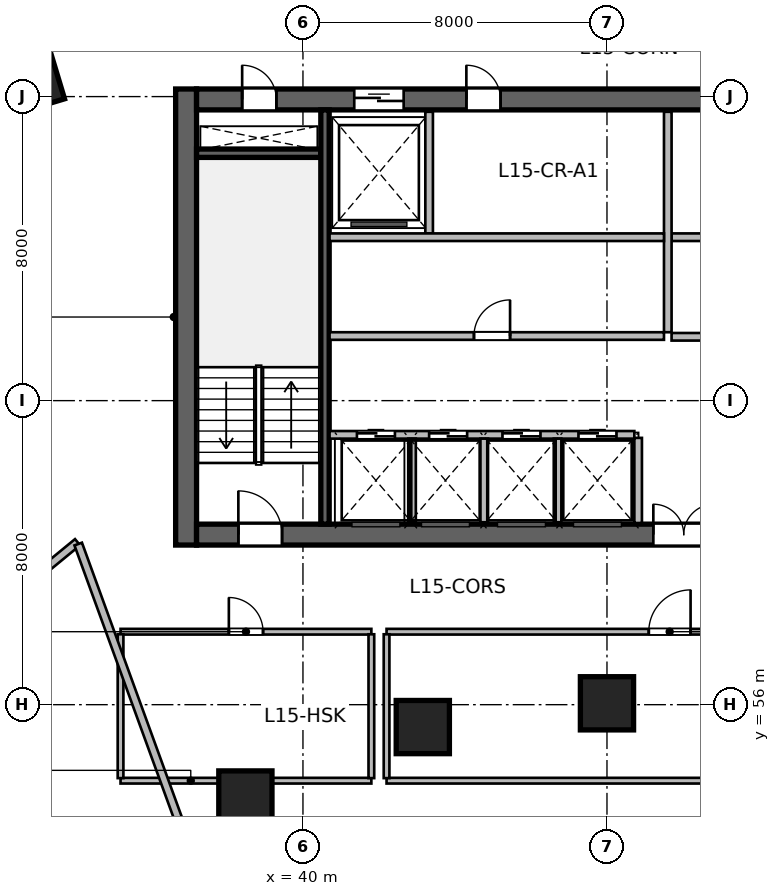
"""IFC4 building model, lengths in metres.
Left out: names, types, materials, properties, quantities, classifications, styles, units other than length and angle.
Written with IfcOpenShell. Run it as: python <this file> out.ifc"""

import sys

from ifc_helpers import new_model, si_unit, direction, frame, frame_2d, origin, origin_2d, place, context, subcontext, project, spatial, rectangle, circle, extrude, source, transform, mapped, element, fill, save


model = new_model("IFC4")
c1 = context("Model", 3, precision=1e-05, world=origin(), true_north=direction((0.0, 1.0)))
c2 = subcontext(c1, "Body", "Model", "MODEL_VIEW")
j1 = project(units=[si_unit("LENGTHUNIT", "METRE"), si_unit("PLANEANGLEUNIT", "RADIAN")], contexts=[c1])
p1 = place(None, origin())
s1 = spatial("IfcSite", under=j1, at=p1, CompositionType="ELEMENT")
p2 = place(p1, origin())
s2 = spatial("IfcBuilding", under=s1, at=p2, CompositionType="ELEMENT")
p3 = place(p2, frame((0.0, 0.0, 67.8)))
s3 = spatial("IfcBuildingStorey", under=s2, at=p3, CompositionType="ELEMENT", Elevation=67.8)
m1 = source(origin(), c2, "Body", "SweptSolid", [
    extrude(rectangle(XDim=12.0, YDim=0.55, at=frame_2d((6.0, 0.0))), origin(), (0.0, 0.0, 1.0), 3.6),
])
p4 = place(p3, frame((36.925, 60.2, 0.0), z_axis=(0.0, 0.0, 1.0), x_axis=(0.0, 1.0, 0.0)))
e1 = element("IfcWall", 1, at=p4, inside=s3, PredefinedType="SHEAR", context=c2, shape_type="MappedRepresentation", body=[
    mapped(m1, transform((0.0, 0.0, 0.0), scale=1.0)),
])
m2 = source(origin(), c2, "Body", "SweptSolid", [
    extrude(rectangle(XDim=21.6, YDim=0.55, at=frame_2d((10.8, 0.0))), origin(), (0.0, 0.0, 1.0), 3.6),
])
p5 = place(p3, frame((37.2, 60.475, 0.0), z_axis=(0.0, 0.0, 1.0), x_axis=(1.0, 0.0, 0.0)))
e2 = element("IfcWall", 2, at=p5, inside=s3, PredefinedType="SHEAR", context=c2, shape_type="MappedRepresentation", body=[
    mapped(m2, transform((0.0, 0.0, 0.0), scale=1.0)),
])
p6 = place(p5, frame((1.1, 0.0, 0.0)))
e3 = element("IfcOpeningElement", 3, at=p6, cuts=e2, PredefinedType="OPENING", context=c2, shape_type="SweptSolid", body=[
    extrude(rectangle(XDim=1.15, YDim=2.15, at=frame_2d((0.575, 1.075))), frame((0.0, 0.285, 0.0), z_axis=(0.0, -1.0, 0.0), x_axis=(1.0, 0.0, 0.0)), (0.0, 0.0, 1.0), 0.57),
])
p7 = place(p5, frame((19.5, 0.0, 0.0)))
e4 = element("IfcOpeningElement", 4, at=p7, cuts=e2, PredefinedType="OPENING", context=c2, shape_type="SweptSolid", body=[
    extrude(rectangle(XDim=0.9, YDim=2.1, at=frame_2d((0.45, 1.05))), frame((0.0, 0.285, 0.0), z_axis=(0.0, -1.0, 0.0), x_axis=(1.0, 0.0, 0.0)), (0.0, 0.0, 1.0), 0.57),
])
p8 = place(p5, frame((12.02, 0.0, 0.0)))
e5 = element("IfcOpeningElement", 5, at=p8, cuts=e2, PredefinedType="OPENING", context=c2, shape_type="SweptSolid", body=[
    extrude(rectangle(XDim=1.6, YDim=2.15, at=frame_2d((0.8, 1.075))), frame((0.0, 0.285, 0.0), z_axis=(0.0, -1.0, 0.0), x_axis=(1.0, 0.0, 0.0)), (0.0, 0.0, 1.0), 0.57),
])
p9 = place(p3, frame((37.2, 71.925, 0.0), z_axis=(0.0, 0.0, 1.0), x_axis=(1.0, 0.0, 0.0)))
e6 = element("IfcWall", 6, at=p9, inside=s3, PredefinedType="SHEAR", context=c2, shape_type="MappedRepresentation", body=[
    mapped(m2, transform((0.0, 0.0, 0.0), scale=1.0)),
])
p10 = place(p9, frame((1.2, 0.0, 0.0)))
e7 = element("IfcOpeningElement", 7, at=p10, cuts=e6, PredefinedType="OPENING", context=c2, shape_type="SweptSolid", body=[
    extrude(rectangle(XDim=0.9, YDim=2.1, at=frame_2d((0.45, 1.05))), frame((0.0, 0.285, 0.0), z_axis=(0.0, -1.0, 0.0), x_axis=(1.0, 0.0, 0.0)), (0.0, 0.0, 1.0), 0.57),
])
p11 = place(p9, frame((14.7, 0.0, 0.0)))
e8 = element("IfcOpeningElement", 8, at=p11, cuts=e6, PredefinedType="OPENING", context=c2, shape_type="SweptSolid", body=[
    extrude(rectangle(XDim=1.2, YDim=2.15, at=frame_2d((0.6, 1.075))), frame((0.0, 0.285, 0.0), z_axis=(0.0, -1.0, 0.0), x_axis=(1.0, 0.0, 0.0)), (0.0, 0.0, 1.0), 0.57),
])
p12 = place(p9, frame((4.15, 0.0, 0.0)))
e9 = element("IfcOpeningElement", 9, at=p12, cuts=e6, PredefinedType="OPENING", context=c2, shape_type="SweptSolid", body=[
    extrude(rectangle(XDim=1.3, YDim=2.15, at=frame_2d((0.65, 1.075))), frame((0.0, 0.285, 0.0), z_axis=(0.0, -1.0, 0.0), x_axis=(1.0, 0.0, 0.0)), (0.0, 0.0, 1.0), 0.57),
])
p13 = place(p9, frame((7.1, 0.0, 0.0)))
e10 = element("IfcOpeningElement", 10, at=p13, cuts=e6, PredefinedType="OPENING", context=c2, shape_type="SweptSolid", body=[
    extrude(rectangle(XDim=0.9, YDim=2.1, at=frame_2d((0.45, 1.05))), frame((0.0, 0.285, 0.0), z_axis=(0.0, -1.0, 0.0), x_axis=(1.0, 0.0, 0.0)), (0.0, 0.0, 1.0), 0.57),
])
m3 = source(origin(), c2, "Body", "SweptSolid", [
    extrude(rectangle(XDim=3.27, YDim=0.22, at=frame_2d((1.635, 0.0))), origin(), (0.0, 0.0, 1.0), 3.6),
])
p14 = place(p3, frame((37.2, 70.51, 0.0), z_axis=(0.0, 0.0, 1.0), x_axis=(1.0, 0.0, 0.0)))
e11 = element("IfcWall", 11, at=p14, inside=s3, PredefinedType="SHEAR", context=c2, shape_type="MappedRepresentation", body=[
    mapped(m3, transform((0.0, 0.0, 0.0), scale=1.0)),
])
m4 = source(origin(), c2, "Body", "SweptSolid", [
    extrude(rectangle(XDim=10.9, YDim=0.22, at=frame_2d((5.45, 0.0))), origin(), (0.0, 0.0, 1.0), 3.6),
])
p15 = place(p3, frame((40.58, 60.75, 0.0), z_axis=(0.0, 0.0, 1.0), x_axis=(0.0, 1.0, 0.0)))
e12 = element("IfcWall", 12, at=p15, inside=s3, PredefinedType="SHEAR", context=c2, shape_type="MappedRepresentation", body=[
    mapped(m4, transform((0.0, 0.0, 0.0), scale=1.0)),
])
m5 = source(origin(), c2, "Body", "SweptSolid", [
    extrude(circle(Radius=0.7, at=origin_2d()), origin(), (0.0, 0.0, 1.0), 3.6),
])
p16 = place(p3, frame((38.485, 53.558, 0.0), z_axis=(0.0, 0.0, 1.0), x_axis=(-0.288697611798, 0.957420330337, 0.0)))
e13 = element("IfcColumn", 13, at=p16, inside=s3, PredefinedType="COLUMN", context=c2, shape_type="MappedRepresentation", body=[
    mapped(m5, transform((0.0, 0.0, 0.0), scale=1.0)),
])
m6 = source(origin(), c2, "Body", "SweptSolid", [
    extrude(rectangle(XDim=1.5, YDim=1.5, at=origin_2d()), origin(), (0.0, 0.0, 1.0), 3.6),
])
p17 = place(p3, frame((32.791, 72.442, 0.0), z_axis=(0.0, 0.0, 1.0), x_axis=(-0.288697611798, 0.957420330337, 0.0)))
e14 = element("IfcColumn", 14, at=p17, inside=s3, PredefinedType="COLUMN", context=c2, shape_type="MappedRepresentation", body=[
    mapped(m6, transform((0.0, 0.0, 0.0), scale=1.0)),
])
for number, where, z_axis, x_axis in (
    (15, (43.154, 55.411, 0.0), (0.0, 0.0, 1.0), (-0.143, 0.99, 0.0)),
    (16, (48.0, 56.036, 0.0), (0.0, 0.0, 1.0), (0.0, 1.0, 0.0)),
):
    element("IfcColumn", number, at=place(p3, frame(where, z_axis=z_axis, x_axis=x_axis)), inside=s3, PredefinedType="COLUMN", context=c2, shape_type="MappedRepresentation", body=[
        mapped(m5, transform((0.0, 0.0, 0.0), scale=1.0)),
    ])
m7 = source(origin(), c2, "Body", "SweptSolid", [
    extrude(rectangle(XDim=2.24, YDim=0.2, at=frame_2d((1.12, 0.0))), origin(), (0.0, 0.0, 1.0), 3.36),
])
p18 = place(p3, frame((48.82, 60.78, 0.0), z_axis=(0.0, 0.0, 1.0), x_axis=(0.0, 1.0, 0.0)))
e17 = element("IfcWall", 17, at=p18, inside=s3, PredefinedType="SOLIDWALL", context=c2, shape_type="MappedRepresentation", body=[
    mapped(m7, transform((0.0, 0.0, 0.0), scale=1.0)),
])
m8 = source(origin(), c2, "Body", "SweptSolid", [
    extrude(rectangle(XDim=5.62, YDim=0.2, at=frame_2d((2.81, 0.0))), origin(), (0.0, 0.0, 1.0), 3.36),
])
p19 = place(p3, frame((49.7, 68.3, 0.0), z_axis=(0.0, 0.0, 1.0), x_axis=(1.0, 0.0, 0.0)))
e18 = element("IfcWall", 18, at=p19, inside=s3, PredefinedType="SOLIDWALL", context=c2, shape_type="MappedRepresentation", body=[
    mapped(m8, transform((0.0, 0.0, 0.0), scale=1.0)),
])
p20 = place(p19, frame((1.6, 0.0, 0.0)))
e19 = element("IfcOpeningElement", 19, at=p20, cuts=e18, PredefinedType="OPENING", context=c2, shape_type="SweptSolid", body=[
    extrude(rectangle(XDim=1.1, YDim=2.15, at=frame_2d((0.55, 1.075))), frame((0.0, 0.11, 0.0), z_axis=(0.0, -1.0, 0.0), x_axis=(1.0, 0.0, 0.0)), (0.0, 0.0, 1.0), 0.22),
])
p21 = place(p19, frame((3.7, 0.0, 0.0)))
e20 = element("IfcOpeningElement", 20, at=p21, cuts=e18, PredefinedType="OPENING", context=c2, shape_type="SweptSolid", body=[
    extrude(rectangle(XDim=1.1, YDim=2.15, at=frame_2d((0.55, 1.075))), frame((0.0, 0.11, 0.0), z_axis=(0.0, -1.0, 0.0), x_axis=(1.0, 0.0, 0.0)), (0.0, 0.0, 1.0), 0.22),
])
m9 = source(origin(), c2, "Body", "SweptSolid", [
    extrude(rectangle(XDim=5.8, YDim=0.2, at=frame_2d((2.9, 0.0))), origin(), (0.0, 0.0, 1.0), 3.36),
])
p22 = place(p3, frame((49.6, 65.8, 0.0), z_axis=(0.0, 0.0, 1.0), x_axis=(0.0, 1.0, 0.0)))
e21 = element("IfcWall", 21, at=p22, inside=s3, PredefinedType="SOLIDWALL", context=c2, shape_type="MappedRepresentation", body=[
    mapped(m9, transform((0.0, 0.0, 0.0), scale=1.0)),
])
p23 = place(p3, frame((49.7, 65.68, 0.0), z_axis=(0.0, 0.0, 1.0), x_axis=(1.0, 0.0, 0.0)))
e22 = element("IfcWall", 22, at=p23, inside=s3, PredefinedType="SOLIDWALL", context=c2, shape_type="MappedRepresentation", body=[
    mapped(m8, transform((0.0, 0.0, 0.0), scale=1.0)),
])
m10 = source(origin(), c2, "Body", "SweptSolid", [
    extrude(rectangle(XDim=3.2, YDim=0.2, at=frame_2d((1.6, 0.0))), origin(), (0.0, 0.0, 1.0), 3.36),
])
p24 = place(p3, frame((43.32, 68.4, 0.0), z_axis=(0.0, 0.0, 1.0), x_axis=(0.0, 1.0, 0.0)))
e23 = element("IfcWall", 23, at=p24, inside=s3, PredefinedType="SOLIDWALL", context=c2, shape_type="MappedRepresentation", body=[
    mapped(m10, transform((0.0, 0.0, 0.0), scale=1.0)),
])
m11 = source(origin(), c2, "Body", "SweptSolid", [
    extrude(rectangle(XDim=8.8, YDim=0.2, at=frame_2d((4.4, 0.0))), origin(), (0.0, 0.0, 1.0), 3.36),
])
p25 = place(p3, frame((40.7, 68.3, 0.0), z_axis=(0.0, 0.0, 1.0), x_axis=(1.0, 0.0, 0.0)))
e24 = element("IfcWall", 24, at=p25, inside=s3, PredefinedType="SOLIDWALL", context=c2, shape_type="MappedRepresentation", body=[
    mapped(m11, transform((0.0, 0.0, 0.0), scale=1.0)),
])
m12 = source(origin(), c2, "Body", "SweptSolid", [
    extrude(rectangle(XDim=8.02, YDim=0.2, at=frame_2d((4.01, 0.0))), origin(), (0.0, 0.0, 1.0), 3.36),
])
p26 = place(p3, frame((40.7, 63.1, 0.0), z_axis=(0.0, 0.0, 1.0), x_axis=(1.0, 0.0, 0.0)))
e25 = element("IfcWall", 25, at=p26, inside=s3, PredefinedType="SOLIDWALL", context=c2, shape_type="MappedRepresentation", body=[
    mapped(m12, transform((0.0, 0.0, 0.0), scale=1.0)),
])
p27 = place(p26, frame((0.72, 0.0, 0.0)))
e26 = element("IfcOpeningElement", 26, at=p27, cuts=e25, PredefinedType="OPENING", context=c2, shape_type="SweptSolid", body=[
    extrude(rectangle(XDim=1.0, YDim=2.15, at=frame_2d((0.5, 1.075))), frame((0.0, 0.11, 0.0), z_axis=(0.0, -1.0, 0.0), x_axis=(1.0, 0.0, 0.0)), (0.0, 0.0, 1.0), 0.22),
])
p28 = place(p26, frame((2.62, 0.0, 0.0)))
e27 = element("IfcOpeningElement", 27, at=p28, cuts=e25, PredefinedType="OPENING", context=c2, shape_type="SweptSolid", body=[
    extrude(rectangle(XDim=1.0, YDim=2.15, at=frame_2d((0.5, 1.075))), frame((0.0, 0.11, 0.0), z_axis=(0.0, -1.0, 0.0), x_axis=(1.0, 0.0, 0.0)), (0.0, 0.0, 1.0), 0.22),
])
p29 = place(p26, frame((4.55, 0.0, 0.0)))
e28 = element("IfcOpeningElement", 28, at=p29, cuts=e25, PredefinedType="OPENING", context=c2, shape_type="SweptSolid", body=[
    extrude(rectangle(XDim=1.0, YDim=2.15, at=frame_2d((0.5, 1.075))), frame((0.0, 0.11, 0.0), z_axis=(0.0, -1.0, 0.0), x_axis=(1.0, 0.0, 0.0)), (0.0, 0.0, 1.0), 0.22),
])
p30 = place(p26, frame((6.55, 0.0, 0.0)))
e29 = element("IfcOpeningElement", 29, at=p30, cuts=e25, PredefinedType="OPENING", context=c2, shape_type="SweptSolid", body=[
    extrude(rectangle(XDim=1.0, YDim=2.15, at=frame_2d((0.5, 1.075))), frame((0.0, 0.11, 0.0), z_axis=(0.0, -1.0, 0.0), x_axis=(1.0, 0.0, 0.0)), (0.0, 0.0, 1.0), 0.22),
])
m13 = source(origin(), c2, "Body", "SweptSolid", [
    extrude(rectangle(XDim=2.2, YDim=0.2, at=frame_2d((1.1, 0.0))), origin(), (0.0, 0.0, 1.0), 3.36),
])
for number, where, z_axis, x_axis in (
    (30, (42.87, 60.8, 0.0), (0.0, 0.0, 1.0), (0.0, 1.0, 0.0)),
    (31, (44.77, 60.8, 0.0), (0.0, 0.0, 1.0), (0.0, 1.0, 0.0)),
    (32, (46.7, 60.8, 0.0), (0.0, 0.0, 1.0), (0.0, 1.0, 0.0)),
):
    element("IfcWall", number, at=place(p3, frame(where, z_axis=z_axis, x_axis=x_axis)), inside=s3, PredefinedType="SOLIDWALL", context=c2, shape_type="MappedRepresentation", body=[
        mapped(m13, transform((0.0, 0.0, 0.0), scale=1.0)),
    ])
p31 = place(p3, frame((40.7, 65.7, 0.0), z_axis=(0.0, 0.0, 1.0), x_axis=(1.0, 0.0, 0.0)))
e33 = element("IfcWall", 33, at=p31, inside=s3, PredefinedType="SOLIDWALL", context=c2, shape_type="MappedRepresentation", body=[
    mapped(m11, transform((0.0, 0.0, 0.0), scale=1.0)),
])
p32 = place(p31, frame((3.8, 0.0, 0.0)))
e34 = element("IfcOpeningElement", 34, at=p32, cuts=e33, PredefinedType="OPENING", context=c2, shape_type="SweptSolid", body=[
    extrude(rectangle(XDim=0.95, YDim=2.15, at=frame_2d((0.475, 1.075))), frame((0.0, 0.11, 0.0), z_axis=(0.0, -1.0, 0.0), x_axis=(1.0, 0.0, 0.0)), (0.0, 0.0, 1.0), 0.22),
])
m14 = source(origin(), c2, "Body", "SweptSolid", [
    extrude(rectangle(XDim=6.6, YDim=0.15, at=frame_2d((3.3, 0.0))), origin(), (0.0, 0.0, 1.0), 2.803),
])
p33 = place(p3, frame((35.2, 54.0, 0.0), z_axis=(0.0, 0.0, 1.0), x_axis=(1.0, 0.0, 0.0)))
e35 = element("IfcWall", 35, at=p33, inside=s3, PredefinedType="PARTITIONING", context=c2, shape_type="MappedRepresentation", body=[
    mapped(m14, transform((0.0, 0.0, 0.0), scale=1.0)),
])
m15 = source(origin(), c2, "Body", "SweptSolid", [
    extrude(rectangle(XDim=6.6, YDim=0.15, at=frame_2d((3.3, 0.0))), origin(), (0.0, 0.0, 1.0), 3.36),
])
p34 = place(p3, frame((35.2, 57.92, 0.0), z_axis=(0.0, 0.0, 1.0), x_axis=(1.0, 0.0, 0.0)))
e36 = element("IfcWall", 36, at=p34, inside=s3, PredefinedType="PARTITIONING", context=c2, shape_type="MappedRepresentation", body=[
    mapped(m15, transform((0.0, 0.0, 0.0), scale=1.0)),
])
p35 = place(p34, frame((2.85, 0.0, 0.0)))
e37 = element("IfcOpeningElement", 37, at=p35, cuts=e36, PredefinedType="OPENING", context=c2, shape_type="SweptSolid", body=[
    extrude(rectangle(XDim=0.9, YDim=2.1, at=frame_2d((0.45, 1.05))), frame((0.0, 0.085, 0.0), z_axis=(0.0, -1.0, 0.0), x_axis=(1.0, 0.0, 0.0)), (0.0, 0.0, 1.0), 0.17),
])
m16 = source(origin(), c2, "Body", "SweptSolid", [
    extrude(rectangle(XDim=3.785, YDim=0.15, at=frame_2d((1.893, 0.0))), origin(), (0.0, 0.0, 1.0), 3.36),
])
for number, where, z_axis, x_axis in (
    (38, (35.2, 54.067, 0.0), (0.0, 0.0, 1.0), (0.0, 1.0, 0.0)),
    (39, (41.8, 54.067, 0.0), (0.0, 0.0, 1.0), (0.0, 1.0, 0.0)),
):
    element("IfcWall", number, at=place(p3, frame(where, z_axis=z_axis, x_axis=x_axis)), inside=s3, PredefinedType="PARTITIONING", context=c2, shape_type="MappedRepresentation", body=[
        mapped(m16, transform((0.0, 0.0, 0.0), scale=1.0)),
    ])
m17 = source(origin(), c2, "Body", "SweptSolid", [
    extrude(rectangle(XDim=11.6, YDim=0.15, at=frame_2d((5.8, 0.0))), origin(), (0.0, 0.0, 1.0), 3.36),
])
p36 = place(p3, frame((42.2, 54.0, 0.0), z_axis=(0.0, 0.0, 1.0), x_axis=(1.0, 0.0, 0.0)))
e40 = element("IfcWall", 40, at=p36, inside=s3, PredefinedType="PARTITIONING", context=c2, shape_type="MappedRepresentation", body=[
    mapped(m17, transform((0.0, 0.0, 0.0), scale=1.0)),
])
p37 = place(p3, frame((42.2, 57.92, 0.0), z_axis=(0.0, 0.0, 1.0), x_axis=(1.0, 0.0, 0.0)))
e41 = element("IfcWall", 41, at=p37, inside=s3, PredefinedType="PARTITIONING", context=c2, shape_type="MappedRepresentation", body=[
    mapped(m17, transform((0.0, 0.0, 0.0), scale=1.0)),
])
p38 = place(p37, frame((6.9, 0.0, 0.0)))
e42 = element("IfcOpeningElement", 42, at=p38, cuts=e41, PredefinedType="OPENING", context=c2, shape_type="SweptSolid", body=[
    extrude(rectangle(XDim=1.1, YDim=2.15, at=frame_2d((0.55, 1.075))), frame((0.0, 0.085, 0.0), z_axis=(0.0, -1.0, 0.0), x_axis=(1.0, 0.0, 0.0)), (0.0, 0.0, 1.0), 0.17),
])
p39 = place(p3, frame((42.2, 54.067, 0.0), z_axis=(0.0, 0.0, 1.0), x_axis=(0.0, 1.0, 0.0)))
e43 = element("IfcWall", 43, at=p39, inside=s3, PredefinedType="PARTITIONING", context=c2, shape_type="MappedRepresentation", body=[
    mapped(m16, transform((0.0, 0.0, 0.0), scale=1.0)),
])
m18 = source(origin(), c2, "Body", "SweptSolid", [
    extrude(rectangle(XDim=6.721, YDim=0.21, at=frame_2d((3.361, 0.0))), origin(), (0.0, 0.0, 1.0), 3.36),
])
p40 = place(p3, frame((28.874, 56.01, 0.0), z_axis=(0.0, 0.0, 1.0), x_axis=(0.772828051199, 0.63461547671, 0.0)))
e44 = element("IfcWall", 44, at=p40, inside=s3, PredefinedType="PARTITIONING", context=c2, shape_type="MappedRepresentation", body=[
    mapped(m18, transform((0.0, 0.0, 0.0), scale=1.0)),
])
m19 = source(origin(), c2, "Body", "SweptSolid", [
    extrude(rectangle(XDim=12.196, YDim=0.21, at=frame_2d((6.098, 0.0))), origin(), (0.0, 0.0, 1.0), 3.36),
])
p41 = place(p3, frame((38.258, 48.766, 0.0), z_axis=(0.0, 0.0, 1.0), x_axis=(-0.342022711534, 0.939691686031, 0.0)))
e45 = element("IfcWall", 45, at=p41, inside=s3, PredefinedType="PARTITIONING", context=c2, shape_type="MappedRepresentation", body=[
    mapped(m19, transform((0.0, 0.0, 0.0), scale=1.0)),
])
m20 = source(origin(), c2, "Body", "SweptSolid", [
    extrude(rectangle(XDim=1.15, YDim=2.15, at=frame_2d((0.575, 1.075))), frame((0.0, 0.025, 0.0), z_axis=(0.0, -1.0, 0.0), x_axis=(1.0, 0.0, 0.0)), (0.0, 0.0, 1.0), 0.05),
])
p42 = place(p6, origin())
e46 = element("IfcDoor", 46, at=p42, inside=s3, OperationType="SINGLE_SWING_LEFT", PredefinedType="DOOR", context=c2, shape_type="MappedRepresentation", body=[
    mapped(m20, transform((0.0, 0.0, 0.0), scale=1.0)),
])
fill(e3, e46)
m21 = source(origin(), c2, "Body", "SweptSolid", [
    extrude(rectangle(XDim=0.9, YDim=2.1, at=frame_2d((0.45, 1.05))), frame((0.0, 0.025, 0.0), z_axis=(0.0, -1.0, 0.0), x_axis=(1.0, 0.0, 0.0)), (0.0, 0.0, 1.0), 0.05),
])
p43 = place(p10, origin())
e47 = element("IfcDoor", 47, at=p43, inside=s3, OperationType="SINGLE_SWING_LEFT", PredefinedType="DOOR", context=c2, shape_type="MappedRepresentation", body=[
    mapped(m21, transform((0.0, 0.0, 0.0), scale=1.0)),
])
fill(e7, e47)
m22 = source(origin(), c2, "Body", "SweptSolid", [
    extrude(rectangle(XDim=1.6, YDim=2.15, at=frame_2d((0.8, 1.075))), frame((0.0, 0.025, 0.0), z_axis=(0.0, -1.0, 0.0), x_axis=(1.0, 0.0, 0.0)), (0.0, 0.0, 1.0), 0.05),
])
p44 = place(p8, origin())
e48 = element("IfcDoor", 48, at=p44, inside=s3, OperationType="DOUBLE_DOOR_SINGLE_SWING", PredefinedType="DOOR", context=c2, shape_type="MappedRepresentation", body=[
    mapped(m22, transform((0.0, 0.0, 0.0), scale=1.0)),
])
fill(e5, e48)
m23 = source(origin(), c2, "Body", "SweptSolid", [
    extrude(rectangle(XDim=1.3, YDim=2.15, at=frame_2d((0.65, 1.075))), frame((0.0, 0.025, 0.0), z_axis=(0.0, -1.0, 0.0), x_axis=(1.0, 0.0, 0.0)), (0.0, 0.0, 1.0), 0.05),
])
p45 = place(p12, origin())
e49 = element("IfcDoor", 49, at=p45, inside=s3, OperationType="DOUBLE_DOOR_SLIDING", PredefinedType="DOOR", context=c2, shape_type="MappedRepresentation", body=[
    mapped(m23, transform((0.0, 0.0, 0.0), scale=1.0)),
])
fill(e9, e49)
p46 = place(p13, origin())
e50 = element("IfcDoor", 50, at=p46, inside=s3, OperationType="SINGLE_SWING_LEFT", PredefinedType="DOOR", context=c2, shape_type="MappedRepresentation", body=[
    mapped(m21, transform((0.0, 0.0, 0.0), scale=1.0)),
])
fill(e10, e50)
m24 = source(origin(), c2, "Body", "SweptSolid", [
    extrude(rectangle(XDim=1.0, YDim=2.15, at=frame_2d((0.5, 1.075))), frame((0.0, 0.025, 0.0), z_axis=(0.0, -1.0, 0.0), x_axis=(1.0, 0.0, 0.0)), (0.0, 0.0, 1.0), 0.05),
])
p47 = place(p27, origin())
e51 = element("IfcDoor", 51, at=p47, inside=s3, OperationType="DOUBLE_DOOR_SLIDING", PredefinedType="DOOR", context=c2, shape_type="MappedRepresentation", body=[
    mapped(m24, transform((0.0, 0.0, 0.0), scale=1.0)),
])
fill(e26, e51)
p48 = place(p28, origin())
e52 = element("IfcDoor", 52, at=p48, inside=s3, OperationType="DOUBLE_DOOR_SLIDING", PredefinedType="DOOR", context=c2, shape_type="MappedRepresentation", body=[
    mapped(m24, transform((0.0, 0.0, 0.0), scale=1.0)),
])
fill(e27, e52)
p49 = place(p29, origin())
e53 = element("IfcDoor", 53, at=p49, inside=s3, OperationType="DOUBLE_DOOR_SLIDING", PredefinedType="DOOR", context=c2, shape_type="MappedRepresentation", body=[
    mapped(m24, transform((0.0, 0.0, 0.0), scale=1.0)),
])
fill(e28, e53)
p50 = place(p30, origin())
e54 = element("IfcDoor", 54, at=p50, inside=s3, OperationType="DOUBLE_DOOR_SLIDING", PredefinedType="DOOR", context=c2, shape_type="MappedRepresentation", body=[
    mapped(m24, transform((0.0, 0.0, 0.0), scale=1.0)),
])
fill(e29, e54)
m25 = source(origin(), c2, "Body", "SweptSolid", [
    extrude(rectangle(XDim=0.95, YDim=2.15, at=frame_2d((0.475, 1.075))), frame((0.0, 0.025, 0.0), z_axis=(0.0, -1.0, 0.0), x_axis=(1.0, 0.0, 0.0)), (0.0, 0.0, 1.0), 0.05),
])
p51 = place(p32, origin())
e55 = element("IfcDoor", 55, at=p51, inside=s3, OperationType="SINGLE_SWING_RIGHT", PredefinedType="DOOR", context=c2, shape_type="MappedRepresentation", body=[
    mapped(m25, transform((0.0, 0.0, 0.0), scale=1.0)),
])
fill(e34, e55)
p52 = place(p35, origin())
e56 = element("IfcDoor", 56, at=p52, inside=s3, OperationType="SINGLE_SWING_LEFT", PredefinedType="DOOR", context=c2, shape_type="MappedRepresentation", body=[
    mapped(m21, transform((0.0, 0.0, 0.0), scale=1.0)),
])
fill(e37, e56)
m26 = source(origin(), c2, "Body", "SweptSolid", [
    extrude(rectangle(XDim=1.1, YDim=2.15, at=frame_2d((0.55, 1.075))), frame((0.0, 0.025, 0.0), z_axis=(0.0, -1.0, 0.0), x_axis=(1.0, 0.0, 0.0)), (0.0, 0.0, 1.0), 0.05),
])
p53 = place(p38, origin())
e57 = element("IfcDoor", 57, at=p53, inside=s3, OperationType="SINGLE_SWING_RIGHT", PredefinedType="DOOR", context=c2, shape_type="MappedRepresentation", body=[
    mapped(m26, transform((0.0, 0.0, 0.0), scale=1.0)),
])
fill(e42, e57)
save(model, sys.argv[1])
